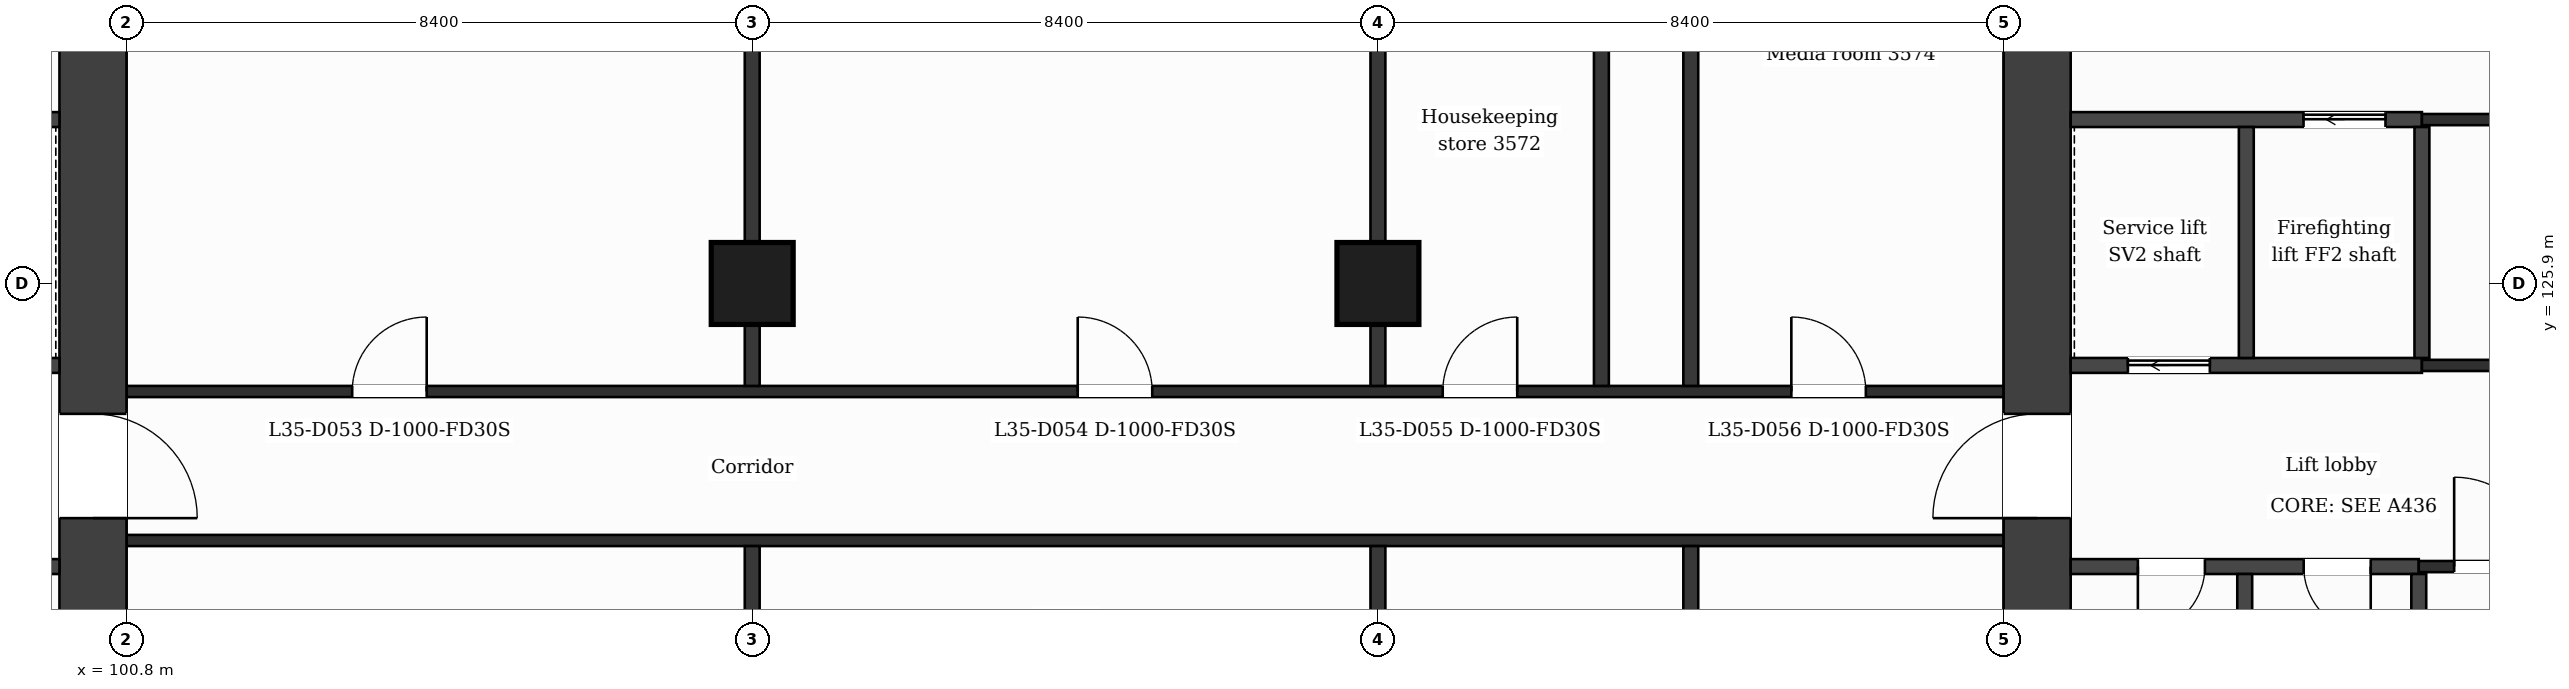
"""IFC4 building model, lengths in metres.
Left out: names, types, materials, properties, quantities, classifications, styles, units other than length and angle.
Written with IfcOpenShell. Run it as: python <this file> out.ifc"""

import sys

from ifc_helpers import new_model, si_unit, direction, frame, frame_2d, origin, origin_2d, place, context, subcontext, project, spatial, rectangle, extrude, element, fill, save


model = new_model("IFC4")
c1 = context("Model", 3, precision=1e-05, world=origin(), true_north=direction((0.0, 1.0)))
c2 = subcontext(c1, "Body", "Model", "MODEL_VIEW")
j1 = project(units=[si_unit("LENGTHUNIT", "METRE"), si_unit("PLANEANGLEUNIT", "RADIAN")], contexts=[c1])
p1 = place(None, origin())
s1 = spatial("IfcSite", under=j1, at=p1, CompositionType="ELEMENT")
p2 = place(p1, origin())
s2 = spatial("IfcBuilding", under=s1, at=p2, CompositionType="ELEMENT")
p3 = place(p2, frame((0.0, 0.0, 151.5)))
s3 = spatial("IfcBuildingStorey", under=s2, at=p3, CompositionType="ELEMENT", Elevation=151.5)
p4 = place(p3, frame((100.35, 131.95, 0.0), z_axis=(0.0, 0.0, 1.0), x_axis=(0.0, -1.0, 0.0)))
e1 = element("IfcWall", 1, at=p4, inside=s3, PredefinedType="SHEAR", context=c2, shape_type="SweptSolid", body=[
    extrude(rectangle(XDim=21.1, YDim=0.9, at=frame_2d((10.55, 0.0))), origin(), (0.0, 0.0, 1.0), 3.7),
])
p5 = place(p4, frame((7.8, 0.0, 0.0)))
e2 = element("IfcOpeningElement", 2, at=p5, cuts=e1, PredefinedType="OPENING", context=c2, shape_type="SweptSolid", body=[
    extrude(rectangle(XDim=1.4, YDim=2.1, at=frame_2d((0.7, 1.05))), frame((0.0, 0.46, 0.0), z_axis=(0.0, -1.0, 0.0), x_axis=(1.0, 0.0, 0.0)), (0.0, 0.0, 1.0), 0.92),
])
p6 = place(p3, frame((126.45, 110.85, 0.0), z_axis=(0.0, 0.0, 1.0), x_axis=(0.0, 1.0, 0.0)))
e3 = element("IfcWall", 3, at=p6, inside=s3, PredefinedType="SHEAR", context=c2, shape_type="SweptSolid", body=[
    extrude(rectangle(XDim=21.1, YDim=0.9, at=frame_2d((10.55, 0.0))), origin(), (0.0, 0.0, 1.0), 3.7),
])
p7 = place(p6, frame((11.9, 0.0, 0.0)))
e4 = element("IfcOpeningElement", 4, at=p7, cuts=e3, PredefinedType="OPENING", context=c2, shape_type="SweptSolid", body=[
    extrude(rectangle(XDim=1.4, YDim=2.1, at=frame_2d((0.7, 1.05))), frame((0.0, 0.46, 0.0), z_axis=(0.0, -1.0, 0.0), x_axis=(1.0, 0.0, 0.0)), (0.0, 0.0, 1.0), 0.92),
])
for number, where, z_axis, x_axis in (
    (5, (109.2, 125.9, 0.0), (0.0, 0.0, 1.0), (1.0, 0.0, 0.0)),
    (6, (117.6, 125.9, 0.0), (0.0, 0.0, 1.0), (1.0, 0.0, 0.0)),
):
    element("IfcColumn", number, at=place(p3, frame(where, z_axis=z_axis, x_axis=x_axis)), inside=s3, PredefinedType="COLUMN", context=c2, shape_type="SweptSolid", body=[
        extrude(rectangle(XDim=1.1, YDim=1.1, at=origin_2d()), origin(), (0.0, 0.0, 1.0), 3.7),
    ])
p8 = place(p3, frame((95.227, 122.1, 0.0), z_axis=(0.0, 0.0, 1.0), x_axis=(1.0, 0.0, 0.0)))
e7 = element("IfcWall", 7, at=p8, inside=s3, PredefinedType="PARTITIONING", context=c2, shape_type="SweptSolid", body=[
    extrude(rectangle(XDim=4.673, YDim=0.2, at=frame_2d((2.336, 0.0))), origin(), (0.0, 0.0, 1.0), 3.38),
])
p9 = place(p8, frame((0.718, 0.0, 0.0)))
e8 = element("IfcOpeningElement", 8, at=p9, cuts=e7, PredefinedType="OPENING", context=c2, shape_type="SweptSolid", body=[
    extrude(rectangle(XDim=0.9, YDim=2.1, at=frame_2d((0.45, 1.05))), frame((0.0, 0.11, 0.0), z_axis=(0.0, -1.0, 0.0), x_axis=(1.0, 0.0, 0.0)), (0.0, 0.0, 1.0), 0.22),
])
p10 = place(p8, frame((3.055, 0.0, 0.0)))
e9 = element("IfcOpeningElement", 9, at=p10, cuts=e7, PredefinedType="OPENING", context=c2, shape_type="SweptSolid", body=[
    extrude(rectangle(XDim=0.9, YDim=2.1, at=frame_2d((0.45, 1.05))), frame((0.0, 0.11, 0.0), z_axis=(0.0, -1.0, 0.0), x_axis=(1.0, 0.0, 0.0)), (0.0, 0.0, 1.0), 0.22),
])
p11 = place(p3, frame((126.9, 122.1, 0.0), z_axis=(0.0, 0.0, 1.0), x_axis=(1.0, 0.0, 0.0)))
e10 = element("IfcWall", 10, at=p11, inside=s3, PredefinedType="PARTITIONING", context=c2, shape_type="SweptSolid", body=[
    extrude(rectangle(XDim=4.673, YDim=0.2, at=frame_2d((2.336, 0.0))), origin(), (0.0, 0.0, 1.0), 3.38),
])
p12 = place(p11, frame((3.128, 0.0, 0.0)))
e11 = element("IfcOpeningElement", 11, at=p12, cuts=e10, PredefinedType="OPENING", context=c2, shape_type="SweptSolid", body=[
    extrude(rectangle(XDim=0.9, YDim=2.1, at=frame_2d((0.45, 1.05))), frame((0.0, 0.11, 0.0), z_axis=(0.0, -1.0, 0.0), x_axis=(1.0, 0.0, 0.0)), (0.0, 0.0, 1.0), 0.22),
])
p13 = place(p11, frame((0.902, 0.0, 0.0)))
e12 = element("IfcOpeningElement", 12, at=p13, cuts=e10, PredefinedType="OPENING", context=c2, shape_type="SweptSolid", body=[
    extrude(rectangle(XDim=0.9, YDim=2.1, at=frame_2d((0.45, 1.05))), frame((0.0, 0.11, 0.0), z_axis=(0.0, -1.0, 0.0), x_axis=(1.0, 0.0, 0.0)), (0.0, 0.0, 1.0), 0.22),
])
p14 = place(p3, frame((131.573, 122.1, 0.0), z_axis=(0.0, 0.0, 1.0), x_axis=(1.0, 0.0, 0.0)))
e13 = element("IfcWall", 13, at=p14, inside=s3, PredefinedType="PARTITIONING", context=c2, shape_type="SweptSolid", body=[
    extrude(rectangle(XDim=2.4, YDim=0.15, at=frame_2d((1.2, 0.0))), origin(), (0.0, 0.0, 1.0), 3.38),
])
p15 = place(p14, frame((0.475, 0.0, 0.0)))
e14 = element("IfcOpeningElement", 14, at=p15, cuts=e13, PredefinedType="OPENING", context=c2, shape_type="SweptSolid", body=[
    extrude(rectangle(XDim=1.2, YDim=2.1, at=frame_2d((0.6, 1.05))), frame((0.0, 0.085, 0.0), z_axis=(0.0, -1.0, 0.0), x_axis=(1.0, 0.0, 0.0)), (0.0, 0.0, 1.0), 0.17),
])
p16 = place(p3, frame((100.8, 122.45, 0.0), z_axis=(0.0, 0.0, 1.0), x_axis=(1.0, 0.0, 0.0)))
e15 = element("IfcWall", 15, at=p16, inside=s3, PredefinedType="PARTITIONING", context=c2, shape_type="SweptSolid", body=[
    extrude(rectangle(XDim=25.2, YDim=0.15, at=frame_2d((12.6, 0.0))), origin(), (0.0, 0.0, 1.0), 3.38),
])
p17 = place(p3, frame((100.8, 124.45, 0.0), z_axis=(0.0, 0.0, 1.0), x_axis=(1.0, 0.0, 0.0)))
e16 = element("IfcWall", 16, at=p17, inside=s3, PredefinedType="PARTITIONING", context=c2, shape_type="SweptSolid", body=[
    extrude(rectangle(XDim=25.2, YDim=0.15, at=frame_2d((12.6, 0.0))), origin(), (0.0, 0.0, 1.0), 3.38),
])
p18 = place(p17, frame((3.03, 0.0, 0.0)))
e17 = element("IfcOpeningElement", 17, at=p18, cuts=e16, PredefinedType="OPENING", context=c2, shape_type="SweptSolid", body=[
    extrude(rectangle(XDim=1.0, YDim=2.1, at=frame_2d((0.5, 1.05))), frame((0.0, 0.085, 0.0), z_axis=(0.0, -1.0, 0.0), x_axis=(1.0, 0.0, 0.0)), (0.0, 0.0, 1.0), 0.17),
])
p19 = place(p17, frame((12.77, 0.0, 0.0)))
e18 = element("IfcOpeningElement", 18, at=p19, cuts=e16, PredefinedType="OPENING", context=c2, shape_type="SweptSolid", body=[
    extrude(rectangle(XDim=1.0, YDim=2.1, at=frame_2d((0.5, 1.05))), frame((0.0, 0.085, 0.0), z_axis=(0.0, -1.0, 0.0), x_axis=(1.0, 0.0, 0.0)), (0.0, 0.0, 1.0), 0.17),
])
p20 = place(p17, frame((17.67, 0.0, 0.0)))
e19 = element("IfcOpeningElement", 19, at=p20, cuts=e16, PredefinedType="OPENING", context=c2, shape_type="SweptSolid", body=[
    extrude(rectangle(XDim=1.0, YDim=2.1, at=frame_2d((0.5, 1.05))), frame((0.0, 0.085, 0.0), z_axis=(0.0, -1.0, 0.0), x_axis=(1.0, 0.0, 0.0)), (0.0, 0.0, 1.0), 0.17),
])
p21 = place(p17, frame((22.35, 0.0, 0.0)))
e20 = element("IfcOpeningElement", 20, at=p21, cuts=e16, PredefinedType="OPENING", context=c2, shape_type="SweptSolid", body=[
    extrude(rectangle(XDim=1.0, YDim=2.1, at=frame_2d((0.5, 1.05))), frame((0.0, 0.085, 0.0), z_axis=(0.0, -1.0, 0.0), x_axis=(1.0, 0.0, 0.0)), (0.0, 0.0, 1.0), 0.17),
])
p22 = place(p3, frame((92.702, 124.8, 0.0), z_axis=(0.0, 0.0, 1.0), x_axis=(1.0, 0.0, 0.0)))
e21 = element("IfcWall", 21, at=p22, inside=s3, PredefinedType="PARTITIONING", context=c2, shape_type="SweptSolid", body=[
    extrude(rectangle(XDim=7.198, YDim=0.2, at=frame_2d((3.599, 0.0))), origin(), (0.0, 0.0, 1.0), 3.38),
])
p23 = place(p22, frame((5.609, 0.0, 0.0)))
e22 = element("IfcOpeningElement", 22, at=p23, cuts=e21, PredefinedType="OPENING", context=c2, shape_type="SweptSolid", body=[
    extrude(rectangle(XDim=1.1, YDim=2.1, at=frame_2d((0.55, 1.05))), frame((0.0, 0.11, 0.0), z_axis=(0.0, -1.0, 0.0), x_axis=(1.0, 0.0, 0.0)), (0.0, 0.0, 1.0), 0.22),
])
p24 = place(p3, frame((126.9, 124.8, 0.0), z_axis=(0.0, 0.0, 1.0), x_axis=(1.0, 0.0, 0.0)))
e23 = element("IfcWall", 23, at=p24, inside=s3, PredefinedType="PARTITIONING", context=c2, shape_type="SweptSolid", body=[
    extrude(rectangle(XDim=4.715, YDim=0.2, at=frame_2d((2.358, 0.0))), origin(), (0.0, 0.0, 1.0), 3.38),
])
p25 = place(p24, frame((0.768, 0.0, 0.0)))
e24 = element("IfcOpeningElement", 24, at=p25, cuts=e23, PredefinedType="OPENING", context=c2, shape_type="SweptSolid", body=[
    extrude(rectangle(XDim=1.1, YDim=2.1, at=frame_2d((0.55, 1.05))), frame((0.0, 0.11, 0.0), z_axis=(0.0, -1.0, 0.0), x_axis=(1.0, 0.0, 0.0)), (0.0, 0.0, 1.0), 0.22),
])
p26 = place(p3, frame((131.615, 124.8, 0.0), z_axis=(0.0, 0.0, 1.0), x_axis=(1.0, 0.0, 0.0)))
e25 = element("IfcWall", 25, at=p26, inside=s3, PredefinedType="PARTITIONING", context=c2, shape_type="SweptSolid", body=[
    extrude(rectangle(XDim=2.483, YDim=0.15, at=frame_2d((1.241, 0.0))), origin(), (0.0, 0.0, 1.0), 3.38),
])
p27 = place(p3, frame((92.827, 128.1, 0.0), z_axis=(0.0, 0.0, 1.0), x_axis=(1.0, 0.0, 0.0)))
e26 = element("IfcWall", 26, at=p27, inside=s3, PredefinedType="PARTITIONING", context=c2, shape_type="SweptSolid", body=[
    extrude(rectangle(XDim=7.073, YDim=0.2, at=frame_2d((3.537, 0.0))), origin(), (0.0, 0.0, 1.0), 3.38),
])
p28 = place(p27, frame((3.042, 0.0, 0.0)))
e27 = element("IfcOpeningElement", 27, at=p28, cuts=e26, PredefinedType="OPENING", context=c2, shape_type="SweptSolid", body=[
    extrude(rectangle(XDim=1.1, YDim=2.1, at=frame_2d((0.55, 1.05))), frame((0.0, 0.11, 0.0), z_axis=(0.0, -1.0, 0.0), x_axis=(1.0, 0.0, 0.0)), (0.0, 0.0, 1.0), 0.22),
])
p29 = place(p3, frame((126.9, 128.1, 0.0), z_axis=(0.0, 0.0, 1.0), x_axis=(1.0, 0.0, 0.0)))
e28 = element("IfcWall", 28, at=p29, inside=s3, PredefinedType="PARTITIONING", context=c2, shape_type="SweptSolid", body=[
    extrude(rectangle(XDim=4.715, YDim=0.2, at=frame_2d((2.358, 0.0))), origin(), (0.0, 0.0, 1.0), 3.38),
])
p30 = place(p29, frame((3.126, 0.0, 0.0)))
e29 = element("IfcOpeningElement", 29, at=p30, cuts=e28, PredefinedType="OPENING", context=c2, shape_type="SweptSolid", body=[
    extrude(rectangle(XDim=1.1, YDim=2.1, at=frame_2d((0.55, 1.05))), frame((0.0, 0.11, 0.0), z_axis=(0.0, -1.0, 0.0), x_axis=(1.0, 0.0, 0.0)), (0.0, 0.0, 1.0), 0.22),
])
p31 = place(p3, frame((131.615, 128.1, 0.0), z_axis=(0.0, 0.0, 1.0), x_axis=(1.0, 0.0, 0.0)))
e30 = element("IfcWall", 30, at=p31, inside=s3, PredefinedType="PARTITIONING", context=c2, shape_type="SweptSolid", body=[
    extrude(rectangle(XDim=2.358, YDim=0.15, at=frame_2d((1.179, 0.0))), origin(), (0.0, 0.0, 1.0), 3.38),
])
p32 = place(p3, frame((109.2, 109.075, 0.0), z_axis=(0.0, 0.0, 1.0), x_axis=(0.0, 1.0, 0.0)))
e31 = element("IfcWall", 31, at=p32, inside=s3, PredefinedType="PARTITIONING", context=c2, shape_type="SweptSolid", body=[
    extrude(rectangle(XDim=13.3, YDim=0.2, at=frame_2d((6.65, 0.0))), origin(), (0.0, 0.0, 1.0), 3.38),
])
p33 = place(p3, frame((109.2, 124.525, 0.0), z_axis=(0.0, 0.0, 1.0), x_axis=(0.0, 1.0, 0.0)))
e32 = element("IfcWall", 32, at=p33, inside=s3, PredefinedType="PARTITIONING", context=c2, shape_type="SweptSolid", body=[
    extrude(rectangle(XDim=9.2, YDim=0.2, at=frame_2d((4.6, 0.0))), origin(), (0.0, 0.0, 1.0), 3.38),
])
p34 = place(p3, frame((117.6, 109.075, 0.0), z_axis=(0.0, 0.0, 1.0), x_axis=(0.0, 1.0, 0.0)))
e33 = element("IfcWall", 33, at=p34, inside=s3, PredefinedType="PARTITIONING", context=c2, shape_type="SweptSolid", body=[
    extrude(rectangle(XDim=13.3, YDim=0.2, at=frame_2d((6.65, 0.0))), origin(), (0.0, 0.0, 1.0), 3.38),
])
p35 = place(p3, frame((117.6, 124.525, 0.0), z_axis=(0.0, 0.0, 1.0), x_axis=(0.0, 1.0, 0.0)))
e34 = element("IfcWall", 34, at=p35, inside=s3, PredefinedType="PARTITIONING", context=c2, shape_type="SweptSolid", body=[
    extrude(rectangle(XDim=9.2, YDim=0.2, at=frame_2d((4.6, 0.0))), origin(), (0.0, 0.0, 1.0), 3.38),
])
p36 = place(p3, frame((120.6, 124.525, 0.0), z_axis=(0.0, 0.0, 1.0), x_axis=(0.0, 1.0, 0.0)))
e35 = element("IfcWall", 35, at=p36, inside=s3, PredefinedType="PARTITIONING", context=c2, shape_type="SweptSolid", body=[
    extrude(rectangle(XDim=5.825, YDim=0.2, at=frame_2d((2.913, 0.0))), origin(), (0.0, 0.0, 1.0), 3.38),
])
p37 = place(p3, frame((121.8, 109.075, 0.0), z_axis=(0.0, 0.0, 1.0), x_axis=(0.0, 1.0, 0.0)))
e36 = element("IfcWall", 36, at=p37, inside=s3, PredefinedType="PARTITIONING", context=c2, shape_type="SweptSolid", body=[
    extrude(rectangle(XDim=13.3, YDim=0.2, at=frame_2d((6.65, 0.0))), origin(), (0.0, 0.0, 1.0), 3.38),
])
p38 = place(p3, frame((121.8, 124.525, 0.0), z_axis=(0.0, 0.0, 1.0), x_axis=(0.0, 1.0, 0.0)))
e37 = element("IfcWall", 37, at=p38, inside=s3, PredefinedType="PARTITIONING", context=c2, shape_type="SweptSolid", body=[
    extrude(rectangle(XDim=9.2, YDim=0.2, at=frame_2d((4.6, 0.0))), origin(), (0.0, 0.0, 1.0), 3.38),
])
for number, where, z_axis, x_axis in (
    (38, (129.237, 118.9, 0.0), (0.0, 0.0, 1.0), (0.0, 1.0, 0.0)),
    (39, (129.258, 124.9, 0.0), (0.0, 0.0, 1.0), (0.0, 1.0, 0.0)),
):
    element("IfcWall", number, at=place(p3, frame(where, z_axis=z_axis, x_axis=x_axis)), inside=s3, PredefinedType="PARTITIONING", context=c2, shape_type="SweptSolid", body=[
        extrude(rectangle(XDim=3.1, YDim=0.2, at=frame_2d((1.55, 0.0))), origin(), (0.0, 0.0, 1.0), 3.38),
    ])
p39 = place(p3, frame((131.573, 116.87, 0.0), z_axis=(0.0, 0.0, 1.0), x_axis=(0.0, 1.0, 0.0)))
e40 = element("IfcWall", 40, at=p39, inside=s3, PredefinedType="PARTITIONING", context=c2, shape_type="SweptSolid", body=[
    extrude(rectangle(XDim=5.13, YDim=0.2, at=frame_2d((2.565, 0.0))), origin(), (0.0, 0.0, 1.0), 3.38),
])
p40 = place(p39, frame((0.68, 0.0, 0.0)))
e41 = element("IfcOpeningElement", 41, at=p40, cuts=e40, PredefinedType="OPENING", context=c2, shape_type="SweptSolid", body=[
    extrude(rectangle(XDim=0.9, YDim=2.1, at=frame_2d((0.45, 1.05))), frame((0.0, 0.11, 0.0), z_axis=(0.0, -1.0, 0.0), x_axis=(1.0, 0.0, 0.0)), (0.0, 0.0, 1.0), 0.22),
])
p41 = place(p3, frame((131.615, 124.9, 0.0), z_axis=(0.0, 0.0, 1.0), x_axis=(0.0, 1.0, 0.0)))
e42 = element("IfcWall", 42, at=p41, inside=s3, PredefinedType="PARTITIONING", context=c2, shape_type="SweptSolid", body=[
    extrude(rectangle(XDim=3.1, YDim=0.2, at=frame_2d((1.55, 0.0))), origin(), (0.0, 0.0, 1.0), 3.38),
])
p42 = place(p15, origin())
e43 = element("IfcDoor", 43, at=p42, inside=s3, OperationType="SINGLE_SWING_LEFT", PredefinedType="DOOR", context=c2, shape_type="SweptSolid", body=[
    extrude(rectangle(XDim=1.2, YDim=2.1, at=frame_2d((0.6, 1.05))), frame((0.0, 0.025, 0.0), z_axis=(0.0, -1.0, 0.0), x_axis=(1.0, 0.0, 0.0)), (0.0, 0.0, 1.0), 0.05),
])
fill(e14, e43)
p43 = place(p30, origin())
e44 = element("IfcDoor", 44, at=p43, inside=s3, OperationType="SLIDING_TO_LEFT", PredefinedType="DOOR", context=c2, shape_type="SweptSolid", body=[
    extrude(rectangle(XDim=1.1, YDim=2.1, at=frame_2d((0.55, 1.05))), frame((0.0, 0.025, 0.0), z_axis=(0.0, -1.0, 0.0), x_axis=(1.0, 0.0, 0.0)), (0.0, 0.0, 1.0), 0.05),
])
fill(e29, e44)
p44 = place(p25, origin())
e45 = element("IfcDoor", 45, at=p44, inside=s3, OperationType="SLIDING_TO_LEFT", PredefinedType="DOOR", context=c2, shape_type="SweptSolid", body=[
    extrude(rectangle(XDim=1.1, YDim=2.1, at=frame_2d((0.55, 1.05))), frame((0.0, 0.025, 0.0), z_axis=(0.0, -1.0, 0.0), x_axis=(1.0, 0.0, 0.0)), (0.0, 0.0, 1.0), 0.05),
])
fill(e24, e45)
p45 = place(p12, origin())
e46 = element("IfcDoor", 46, at=p45, inside=s3, OperationType="SINGLE_SWING_RIGHT", PredefinedType="DOOR", context=c2, shape_type="SweptSolid", body=[
    extrude(rectangle(XDim=0.9, YDim=2.1, at=frame_2d((0.45, 1.05))), frame((0.0, 0.025, 0.0), z_axis=(0.0, -1.0, 0.0), x_axis=(1.0, 0.0, 0.0)), (0.0, 0.0, 1.0), 0.05),
])
fill(e11, e46)
p46 = place(p13, origin())
e47 = element("IfcDoor", 47, at=p46, inside=s3, OperationType="SINGLE_SWING_LEFT", PredefinedType="DOOR", context=c2, shape_type="SweptSolid", body=[
    extrude(rectangle(XDim=0.9, YDim=2.1, at=frame_2d((0.45, 1.05))), frame((0.0, 0.025, 0.0), z_axis=(0.0, -1.0, 0.0), x_axis=(1.0, 0.0, 0.0)), (0.0, 0.0, 1.0), 0.05),
])
fill(e12, e47)
p47 = place(p18, origin())
e48 = element("IfcDoor", 48, at=p47, inside=s3, OperationType="SINGLE_SWING_RIGHT", PredefinedType="DOOR", context=c2, shape_type="SweptSolid", body=[
    extrude(rectangle(XDim=1.0, YDim=2.1, at=frame_2d((0.5, 1.05))), frame((0.0, 0.025, 0.0), z_axis=(0.0, -1.0, 0.0), x_axis=(1.0, 0.0, 0.0)), (0.0, 0.0, 1.0), 0.05),
])
fill(e17, e48)
p48 = place(p19, origin())
e49 = element("IfcDoor", 49, at=p48, inside=s3, OperationType="SINGLE_SWING_LEFT", PredefinedType="DOOR", context=c2, shape_type="SweptSolid", body=[
    extrude(rectangle(XDim=1.0, YDim=2.1, at=frame_2d((0.5, 1.05))), frame((0.0, 0.025, 0.0), z_axis=(0.0, -1.0, 0.0), x_axis=(1.0, 0.0, 0.0)), (0.0, 0.0, 1.0), 0.05),
])
fill(e18, e49)
p49 = place(p20, origin())
e50 = element("IfcDoor", 50, at=p49, inside=s3, OperationType="SINGLE_SWING_RIGHT", PredefinedType="DOOR", context=c2, shape_type="SweptSolid", body=[
    extrude(rectangle(XDim=1.0, YDim=2.1, at=frame_2d((0.5, 1.05))), frame((0.0, 0.025, 0.0), z_axis=(0.0, -1.0, 0.0), x_axis=(1.0, 0.0, 0.0)), (0.0, 0.0, 1.0), 0.05),
])
fill(e19, e50)
p50 = place(p21, origin())
e51 = element("IfcDoor", 51, at=p50, inside=s3, OperationType="SINGLE_SWING_LEFT", PredefinedType="DOOR", context=c2, shape_type="SweptSolid", body=[
    extrude(rectangle(XDim=1.0, YDim=2.1, at=frame_2d((0.5, 1.05))), frame((0.0, 0.025, 0.0), z_axis=(0.0, -1.0, 0.0), x_axis=(1.0, 0.0, 0.0)), (0.0, 0.0, 1.0), 0.05),
])
fill(e20, e51)
p51 = place(p5, origin())
e52 = element("IfcDoor", 52, at=p51, inside=s3, OperationType="SINGLE_SWING_RIGHT", PredefinedType="DOOR", context=c2, shape_type="SweptSolid", body=[
    extrude(rectangle(XDim=1.4, YDim=2.1, at=frame_2d((0.7, 1.05))), frame((0.0, 0.025, 0.0), z_axis=(0.0, -1.0, 0.0), x_axis=(1.0, 0.0, 0.0)), (0.0, 0.0, 1.0), 0.05),
])
fill(e2, e52)
p52 = place(p7, origin())
e53 = element("IfcDoor", 53, at=p52, inside=s3, OperationType="SINGLE_SWING_LEFT", PredefinedType="DOOR", context=c2, shape_type="SweptSolid", body=[
    extrude(rectangle(XDim=1.4, YDim=2.1, at=frame_2d((0.7, 1.05))), frame((0.0, 0.025, 0.0), z_axis=(0.0, -1.0, 0.0), x_axis=(1.0, 0.0, 0.0)), (0.0, 0.0, 1.0), 0.05),
])
fill(e4, e53)
save(model, sys.argv[1])
